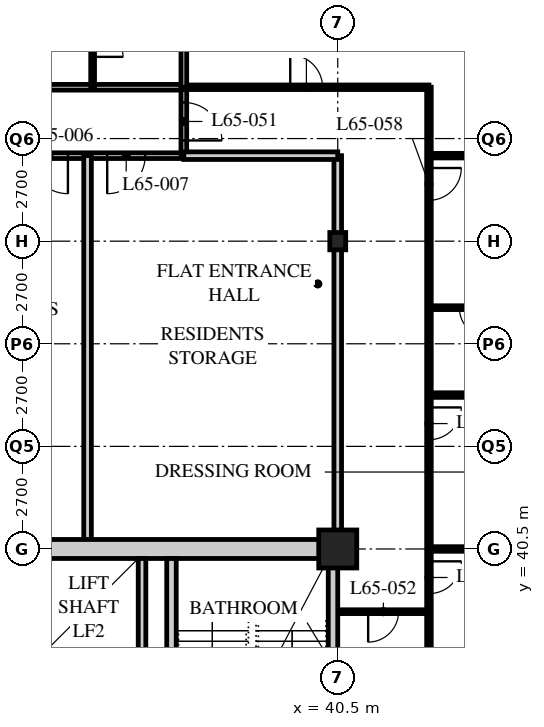
"""IFC4 building model, lengths in metres.
Left out: names, types, materials, properties, quantities, classifications, styles, units other than length and angle.
Written with IfcOpenShell. Run it as: python <this file> out.ifc"""

import sys

from ifc_helpers import new_model, si_unit, direction, frame, frame_2d, origin, origin_2d, place, context, subcontext, project, spatial, rectangle, hollow_rectangle, i_section, extrude, element, fill, save


model = new_model("IFC4")
c1 = context("Model", 3, precision=1e-05, world=origin(), true_north=direction((0.0, 1.0)))
c2 = subcontext(c1, "Body", "Model", "MODEL_VIEW")
j1 = project(units=[si_unit("LENGTHUNIT", "METRE"), si_unit("PLANEANGLEUNIT", "RADIAN")], contexts=[c1])
p1 = place(None, origin())
s1 = spatial("IfcSite", under=j1, at=p1, CompositionType="ELEMENT")
p2 = place(p1, origin())
s2 = spatial("IfcBuilding", under=s1, at=p2, CompositionType="ELEMENT")
p3 = place(p2, frame((0.0, 0.0, 254.1)))
s3 = spatial("IfcBuildingStorey", under=s2, at=p3, CompositionType="ELEMENT", Elevation=254.1)
p4 = place(p3, frame((40.5, 40.5, 0.0), z_axis=(0.0, 0.0, 1.0), x_axis=(1.0, 0.0, 0.0)))
e1 = element("IfcColumn", 1, at=p4, inside=s3, PredefinedType="COLUMN", context=c2, shape_type="SweptSolid", body=[
    extrude(hollow_rectangle(XDim=1.0, YDim=1.0, WallThickness=0.1, at=origin_2d()), origin(), (0.0, 0.0, 1.0), 3.9),
])
p5 = place(p3, frame((40.5, 48.6, 0.0), z_axis=(0.0, 0.0, 1.0), x_axis=(1.0, 0.0, 0.0)))
e2 = element("IfcColumn", 2, at=p5, inside=s3, PredefinedType="COLUMN", context=c2, shape_type="SweptSolid", body=[
    extrude(i_section(OverallWidth=0.418, OverallDepth=0.456, WebThickness=0.042, FlangeThickness=0.067, FilletRadius=0.015, at=origin_2d()), origin(), (0.0, 0.0, 1.0), 3.9),
])
p6 = place(p3, frame((12.15, 52.65, 0.0), z_axis=(0.0, 0.0, 1.0), x_axis=(1.0, 0.0, 0.0)))
e3 = element("IfcWall", 3, at=p6, inside=s3, PredefinedType="PARTITIONING", context=c2, shape_type="SweptSolid", body=[
    extrude(rectangle(XDim=24.3, YDim=0.15, at=frame_2d((12.15, 0.0))), origin(), (0.0, 0.0, 1.0), 3.69),
])
p7 = place(p6, frame((4.45, 0.0, 0.0)))
e4 = element("IfcOpeningElement", 4, at=p7, cuts=e3, PredefinedType="OPENING", context=c2, shape_type="SweptSolid", body=[
    extrude(rectangle(XDim=1.0, YDim=2.1, at=frame_2d((0.5, 1.05))), frame((0.0, 0.085, 0.0), z_axis=(0.0, -1.0, 0.0), x_axis=(1.0, 0.0, 0.0)), (0.0, 0.0, 1.0), 0.17),
])
p8 = place(p6, frame((1.525, 0.0, 0.0)))
e5 = element("IfcOpeningElement", 5, at=p8, cuts=e3, PredefinedType="OPENING", context=c2, shape_type="SweptSolid", body=[
    extrude(rectangle(XDim=1.0, YDim=2.1, at=frame_2d((0.5, 1.05))), frame((0.0, 0.085, 0.0), z_axis=(0.0, -1.0, 0.0), x_axis=(1.0, 0.0, 0.0)), (0.0, 0.0, 1.0), 0.17),
])
p9 = place(p3, frame((29.56, 50.85, 0.0), z_axis=(0.0, 0.0, 1.0), x_axis=(1.0, 0.0, 0.0)))
e6 = element("IfcWall", 6, at=p9, inside=s3, PredefinedType="PARTITIONING", context=c2, shape_type="SweptSolid", body=[
    extrude(rectangle(XDim=6.89, YDim=0.15, at=frame_2d((3.445, 0.0))), origin(), (0.0, 0.0, 1.0), 3.69),
])
p10 = place(p9, frame((0.657, 0.0, 0.0)))
e7 = element("IfcOpeningElement", 7, at=p10, cuts=e6, PredefinedType="OPENING", context=c2, shape_type="SweptSolid", body=[
    extrude(rectangle(XDim=1.0, YDim=2.1, at=frame_2d((0.5, 1.05))), frame((0.0, 0.085, 0.0), z_axis=(0.0, -1.0, 0.0), x_axis=(1.0, 0.0, 0.0)), (0.0, 0.0, 1.0), 0.17),
])
p11 = place(p9, frame((2.84, 0.0, 0.0)))
e8 = element("IfcOpeningElement", 8, at=p11, cuts=e6, PredefinedType="OPENING", context=c2, shape_type="SweptSolid", body=[
    extrude(rectangle(XDim=1.0, YDim=2.1, at=frame_2d((0.5, 1.05))), frame((0.0, 0.085, 0.0), z_axis=(0.0, -1.0, 0.0), x_axis=(1.0, 0.0, 0.0)), (0.0, 0.0, 1.0), 0.17),
])
p12 = place(p9, frame((4.873, 0.0, 0.0)))
e9 = element("IfcOpeningElement", 9, at=p12, cuts=e6, PredefinedType="OPENING", context=c2, shape_type="SweptSolid", body=[
    extrude(rectangle(XDim=1.0, YDim=2.1, at=frame_2d((0.5, 1.05))), frame((0.0, 0.085, 0.0), z_axis=(0.0, -1.0, 0.0), x_axis=(1.0, 0.0, 0.0)), (0.0, 0.0, 1.0), 0.17),
])
p13 = place(p3, frame((33.917, 50.85, 0.0), z_axis=(0.0, 0.0, 1.0), x_axis=(0.0, -1.0, 0.0)))
e10 = element("IfcWall", 10, at=p13, inside=s3, PredefinedType="SOLIDWALL", context=c2, shape_type="SweptSolid", body=[
    extrude(rectangle(XDim=10.35, YDim=0.2, at=frame_2d((5.175, 0.0))), origin(), (0.0, 0.0, 1.0), 3.69),
])
p14 = place(p3, frame((36.45, 50.85, 0.0), z_axis=(0.0, 0.0, 1.0), x_axis=(0.0, 1.0, 0.0)))
e11 = element("IfcWall", 11, at=p14, inside=s3, PredefinedType="PARTITIONING", context=c2, shape_type="SweptSolid", body=[
    extrude(rectangle(XDim=1.8, YDim=0.15, at=frame_2d((0.9, 0.0))), origin(), (0.0, 0.0, 1.0), 3.69),
])
p15 = place(p14, frame((0.4, 0.0, 0.0)))
e12 = element("IfcOpeningElement", 12, at=p15, cuts=e11, PredefinedType="OPENING", context=c2, shape_type="SweptSolid", body=[
    extrude(rectangle(XDim=1.0, YDim=2.1, at=frame_2d((0.5, 1.05))), frame((0.0, 0.085, 0.0), z_axis=(0.0, -1.0, 0.0), x_axis=(1.0, 0.0, 0.0)), (0.0, 0.0, 1.0), 0.17),
])
p16 = place(p3, frame((40.5, 40.5, 0.0), z_axis=(0.0, 0.0, 1.0), x_axis=(0.0, 1.0, 0.0)))
e13 = element("IfcWall", 13, at=p16, inside=s3, PredefinedType="SOLIDWALL", context=c2, shape_type="SweptSolid", body=[
    extrude(rectangle(XDim=10.35, YDim=0.2, at=frame_2d((5.175, 0.0))), origin(), (0.0, 0.0, 1.0), 3.078),
])
p17 = place(p3, frame((34.05, 52.65, 0.0), z_axis=(0.0, 0.0, 1.0), x_axis=(0.0, 1.0, 0.0)))
e14 = element("IfcWall", 14, at=p17, inside=s3, PredefinedType="PARTITIONING", context=c2, shape_type="SweptSolid", body=[
    extrude(rectangle(XDim=2.4, YDim=0.1, at=frame_2d((1.2, 0.0))), origin(), (0.0, 0.0, 1.0), 3.69),
])
p18 = place(p17, frame((0.8, 0.0, 0.0)))
e15 = element("IfcOpeningElement", 15, at=p18, cuts=e14, PredefinedType="OPENING", context=c2, shape_type="SweptSolid", body=[
    extrude(rectangle(XDim=0.8, YDim=2.1, at=frame_2d((0.4, 1.05))), frame((0.0, 0.06, 0.0), z_axis=(0.0, -1.0, 0.0), x_axis=(1.0, 0.0, 0.0)), (0.0, 0.0, 1.0), 0.12),
])
p19 = place(p3, frame((40.5, 38.85, 0.0), z_axis=(0.0, 0.0, 1.0), x_axis=(1.0, 0.0, 0.0)))
e16 = element("IfcWall", 16, at=p19, inside=s3, PredefinedType="PARTITIONING", context=c2, shape_type="SweptSolid", body=[
    extrude(rectangle(XDim=2.4, YDim=0.1, at=frame_2d((1.2, 0.0))), origin(), (0.0, 0.0, 1.0), 3.69),
])
p20 = place(p19, frame((0.8, 0.0, 0.0)))
e17 = element("IfcOpeningElement", 17, at=p20, cuts=e16, PredefinedType="OPENING", context=c2, shape_type="SweptSolid", body=[
    extrude(rectangle(XDim=0.8, YDim=2.1, at=frame_2d((0.4, 1.05))), frame((0.0, 0.06, 0.0), z_axis=(0.0, -1.0, 0.0), x_axis=(1.0, 0.0, 0.0)), (0.0, 0.0, 1.0), 0.12),
])
p21 = place(p3, frame((42.9, 52.65, 0.0), z_axis=(0.0, 0.0, 1.0), x_axis=(0.0, -1.0, 0.0)))
e18 = element("IfcWall", 18, at=p21, inside=s3, PredefinedType="PARTITIONING", context=c2, shape_type="SweptSolid", body=[
    extrude(rectangle(XDim=16.2, YDim=0.12, at=frame_2d((8.1, 0.0))), origin(), (0.0, 0.0, 1.0), 3.69),
])
p22 = place(p21, frame((2.125, 0.0, 0.0)))
e19 = element("IfcOpeningElement", 19, at=p22, cuts=e18, PredefinedType="OPENING", context=c2, shape_type="SweptSolid", body=[
    extrude(rectangle(XDim=0.85, YDim=2.1, at=frame_2d((0.425, 1.05))), frame((0.0, 0.07, 0.0), z_axis=(0.0, -1.0, 0.0), x_axis=(1.0, 0.0, 0.0)), (0.0, 0.0, 1.0), 0.14),
])
p23 = place(p21, frame((8.425, 0.0, 0.0)))
e20 = element("IfcOpeningElement", 20, at=p23, cuts=e18, PredefinedType="OPENING", context=c2, shape_type="SweptSolid", body=[
    extrude(rectangle(XDim=0.85, YDim=2.1, at=frame_2d((0.425, 1.05))), frame((0.0, 0.07, 0.0), z_axis=(0.0, -1.0, 0.0), x_axis=(1.0, 0.0, 0.0)), (0.0, 0.0, 1.0), 0.14),
])
p24 = place(p21, frame((12.475, 0.0, 0.0)))
e21 = element("IfcOpeningElement", 21, at=p24, cuts=e18, PredefinedType="OPENING", context=c2, shape_type="SweptSolid", body=[
    extrude(rectangle(XDim=0.85, YDim=2.1, at=frame_2d((0.425, 1.05))), frame((0.0, 0.07, 0.0), z_axis=(0.0, -1.0, 0.0), x_axis=(1.0, 0.0, 0.0)), (0.0, 0.0, 1.0), 0.14),
])
p25 = place(p3, frame((36.45, 52.65, 0.0), z_axis=(0.0, 0.0, 1.0), x_axis=(1.0, 0.0, 0.0)))
e22 = element("IfcWall", 22, at=p25, inside=s3, PredefinedType="PARTITIONING", context=c2, shape_type="SweptSolid", body=[
    extrude(rectangle(XDim=6.45, YDim=0.12, at=frame_2d((3.225, 0.0))), origin(), (0.0, 0.0, 1.0), 3.69),
])
p26 = place(p25, frame((2.8, 0.0, 0.0)))
e23 = element("IfcOpeningElement", 23, at=p26, cuts=e22, PredefinedType="OPENING", context=c2, shape_type="SweptSolid", body=[
    extrude(rectangle(XDim=0.85, YDim=2.1, at=frame_2d((0.425, 1.05))), frame((0.0, 0.07, 0.0), z_axis=(0.0, -1.0, 0.0), x_axis=(1.0, 0.0, 0.0)), (0.0, 0.0, 1.0), 0.14),
])
p27 = place(p3, frame((36.45, 50.85, 0.0), z_axis=(0.0, 0.0, 1.0), x_axis=(1.0, 0.0, 0.0)))
e24 = element("IfcWall", 24, at=p27, inside=s3, PredefinedType="SOLIDWALL", context=c2, shape_type="SweptSolid", body=[
    extrude(rectangle(XDim=4.05, YDim=0.2, at=frame_2d((2.025, 0.0))), origin(), (0.0, 0.0, 1.0), 3.69),
])
p28 = place(p3, frame((42.9, 50.85, 0.0), z_axis=(0.0, 0.0, 1.0), x_axis=(1.0, 0.0, 0.0)))
e25 = element("IfcWall", 25, at=p28, inside=s3, PredefinedType="PARTITIONING", context=c2, shape_type="SweptSolid", body=[
    extrude(rectangle(XDim=13.5, YDim=0.12, at=frame_2d((6.75, 0.0))), origin(), (0.0, 0.0, 1.0), 3.69),
])
p29 = place(p3, frame((36.45, 64.5, 0.0), z_axis=(0.0, 0.0, 1.0), x_axis=(0.0, -1.0, 0.0)))
e26 = element("IfcWall", 26, at=p29, inside=s3, PredefinedType="PARTITIONING", context=c2, shape_type="SweptSolid", body=[
    extrude(rectangle(XDim=11.85, YDim=0.15, at=frame_2d((5.925, 0.0))), origin(), (0.0, 0.0, 1.0), 3.69),
])
p30 = place(p3, frame((42.9, 46.85, 0.0), z_axis=(0.0, 0.0, 1.0), x_axis=(1.0, 0.0, 0.0)))
e27 = element("IfcWall", 27, at=p30, inside=s3, PredefinedType="PARTITIONING", context=c2, shape_type="SweptSolid", body=[
    extrude(rectangle(XDim=2.4, YDim=0.1, at=frame_2d((1.2, 0.0))), origin(), (0.0, 0.0, 1.0), 3.69),
])
p31 = place(p30, frame((0.8, 0.0, 0.0)))
e28 = element("IfcOpeningElement", 28, at=p31, cuts=e27, PredefinedType="OPENING", context=c2, shape_type="SweptSolid", body=[
    extrude(rectangle(XDim=0.8, YDim=2.1, at=frame_2d((0.4, 1.05))), frame((0.0, 0.06, 0.0), z_axis=(0.0, -1.0, 0.0), x_axis=(1.0, 0.0, 0.0)), (0.0, 0.0, 1.0), 0.12),
])
p32 = place(p3, frame((42.9, 44.55, 0.0), z_axis=(0.0, 0.0, 1.0), x_axis=(1.0, 0.0, 0.0)))
e29 = element("IfcWall", 29, at=p32, inside=s3, PredefinedType="PARTITIONING", context=c2, shape_type="SweptSolid", body=[
    extrude(rectangle(XDim=13.5, YDim=0.12, at=frame_2d((6.75, 0.0))), origin(), (0.0, 0.0, 1.0), 3.69),
])
p33 = place(p3, frame((42.9, 40.5, 0.0), z_axis=(0.0, 0.0, 1.0), x_axis=(1.0, 0.0, 0.0)))
e30 = element("IfcWall", 30, at=p33, inside=s3, PredefinedType="PARTITIONING", context=c2, shape_type="SweptSolid", body=[
    extrude(rectangle(XDim=13.5, YDim=0.12, at=frame_2d((6.75, 0.0))), origin(), (0.0, 0.0, 1.0), 3.078),
])
p34 = place(p3, frame((15.95, 40.5, 0.0), z_axis=(0.0, 0.0, 1.0), x_axis=(1.0, 0.0, 0.0)))
e31 = element("IfcWall", 31, at=p34, inside=s3, PredefinedType="SOLIDWALL", context=c2, shape_type="SweptSolid", body=[
    extrude(rectangle(XDim=24.55, YDim=0.5, at=frame_2d((12.275, 0.0))), origin(), (0.0, 0.0, 1.0), 3.04),
])
p35 = place(p34, frame((11.5, 0.0, 0.0)))
e32 = element("IfcOpeningElement", 32, at=p35, cuts=e31, PredefinedType="OPENING", context=c2, shape_type="SweptSolid", body=[
    extrude(rectangle(XDim=1.8, YDim=2.4, at=frame_2d((0.9, 1.2))), frame((0.0, 0.26, 0.0), z_axis=(0.0, -1.0, 0.0), x_axis=(1.0, 0.0, 0.0)), (0.0, 0.0, 1.0), 0.52),
])
p36 = place(p3, frame((40.375, 24.55, 0.0), z_axis=(0.0, 0.0, 1.0), x_axis=(0.0, 1.0, 0.0)))
e33 = element("IfcWall", 33, at=p36, inside=s3, PredefinedType="SOLIDWALL", context=c2, shape_type="SweptSolid", body=[
    extrude(rectangle(XDim=15.7, YDim=0.25, at=frame_2d((7.85, 0.0))), origin(), (0.0, 0.0, 1.0), 3.078),
])
p37 = place(p3, frame((36.125, 32.5, 0.0), z_axis=(0.0, 0.0, 1.0), x_axis=(0.0, 1.0, 0.0)))
e34 = element("IfcWall", 34, at=p37, inside=s3, PredefinedType="SOLIDWALL", context=c2, shape_type="SweptSolid", body=[
    extrude(rectangle(XDim=7.75, YDim=0.25, at=frame_2d((3.875, 0.0))), origin(), (0.0, 0.0, 1.0), 3.69),
])
p38 = place(p37, frame((0.45, 0.0, 0.0)))
e35 = element("IfcOpeningElement", 35, at=p38, cuts=e34, PredefinedType="OPENING", context=c2, shape_type="SweptSolid", body=[
    extrude(rectangle(XDim=1.2, YDim=2.1, at=frame_2d((0.6, 1.05))), frame((0.0, 0.135, 0.0), z_axis=(0.0, -1.0, 0.0), x_axis=(1.0, 0.0, 0.0)), (0.0, 0.0, 1.0), 0.27),
])
p39 = place(p3, frame((35.35, 37.65, 0.0), z_axis=(0.0, 0.0, 1.0), x_axis=(0.0, 1.0, 0.0)))
e36 = element("IfcWall", 36, at=p39, inside=s3, PredefinedType="SOLIDWALL", context=c2, shape_type="SweptSolid", body=[
    extrude(rectangle(XDim=2.6, YDim=0.2, at=frame_2d((1.3, 0.0))), origin(), (0.0, 0.0, 1.0), 3.69),
])
p40 = place(p11, origin())
e37 = element("IfcDoor", 37, at=p40, inside=s3, OperationType="SINGLE_SWING_LEFT", PredefinedType="DOOR", context=c2, shape_type="SweptSolid", body=[
    extrude(rectangle(XDim=1.0, YDim=2.1, at=frame_2d((0.5, 1.05))), frame((0.0, 0.025, 0.0), z_axis=(0.0, -1.0, 0.0), x_axis=(1.0, 0.0, 0.0)), (0.0, 0.0, 1.0), 0.05),
])
fill(e8, e37)
p41 = place(p12, origin())
e38 = element("IfcDoor", 38, at=p41, inside=s3, OperationType="SINGLE_SWING_RIGHT", PredefinedType="DOOR", context=c2, shape_type="SweptSolid", body=[
    extrude(rectangle(XDim=1.0, YDim=2.1, at=frame_2d((0.5, 1.05))), frame((0.0, 0.025, 0.0), z_axis=(0.0, -1.0, 0.0), x_axis=(1.0, 0.0, 0.0)), (0.0, 0.0, 1.0), 0.05),
])
fill(e9, e38)
p42 = place(p18, origin())
e39 = element("IfcDoor", 39, at=p42, inside=s3, OperationType="SINGLE_SWING_RIGHT", PredefinedType="DOOR", context=c2, shape_type="SweptSolid", body=[
    extrude(rectangle(XDim=0.8, YDim=2.1, at=frame_2d((0.4, 1.05))), frame((0.0, 0.025, 0.0), z_axis=(0.0, -1.0, 0.0), x_axis=(1.0, 0.0, 0.0)), (0.0, 0.0, 1.0), 0.05),
])
fill(e15, e39)
p43 = place(p15, origin())
e40 = element("IfcDoor", 40, at=p43, inside=s3, OperationType="SINGLE_SWING_RIGHT", PredefinedType="DOOR", context=c2, shape_type="SweptSolid", body=[
    extrude(rectangle(XDim=1.0, YDim=2.1, at=frame_2d((0.5, 1.05))), frame((0.0, 0.025, 0.0), z_axis=(0.0, -1.0, 0.0), x_axis=(1.0, 0.0, 0.0)), (0.0, 0.0, 1.0), 0.05),
])
fill(e12, e40)
p44 = place(p20, origin())
e41 = element("IfcDoor", 41, at=p44, inside=s3, OperationType="SINGLE_SWING_RIGHT", PredefinedType="DOOR", context=c2, shape_type="SweptSolid", body=[
    extrude(rectangle(XDim=0.8, YDim=2.1, at=frame_2d((0.4, 1.05))), frame((0.0, 0.025, 0.0), z_axis=(0.0, -1.0, 0.0), x_axis=(1.0, 0.0, 0.0)), (0.0, 0.0, 1.0), 0.05),
])
fill(e17, e41)
p45 = place(p26, origin())
e42 = element("IfcDoor", 42, at=p45, inside=s3, OperationType="SINGLE_SWING_LEFT", PredefinedType="DOOR", context=c2, shape_type="SweptSolid", body=[
    extrude(rectangle(XDim=0.85, YDim=2.1, at=frame_2d((0.425, 1.05))), frame((0.0, 0.025, 0.0), z_axis=(0.0, -1.0, 0.0), x_axis=(1.0, 0.0, 0.0)), (0.0, 0.0, 1.0), 0.05),
])
fill(e23, e42)
p46 = place(p31, origin())
e43 = element("IfcDoor", 43, at=p46, inside=s3, OperationType="SINGLE_SWING_LEFT", PredefinedType="DOOR", context=c2, shape_type="SweptSolid", body=[
    extrude(rectangle(XDim=0.8, YDim=2.1, at=frame_2d((0.4, 1.05))), frame((0.0, 0.025, 0.0), z_axis=(0.0, -1.0, 0.0), x_axis=(1.0, 0.0, 0.0)), (0.0, 0.0, 1.0), 0.05),
])
fill(e28, e43)
p47 = place(p22, origin())
e44 = element("IfcDoor", 44, at=p47, inside=s3, OperationType="SINGLE_SWING_LEFT", PredefinedType="DOOR", context=c2, shape_type="SweptSolid", body=[
    extrude(rectangle(XDim=0.85, YDim=2.1, at=frame_2d((0.425, 1.05))), frame((0.0, 0.025, 0.0), z_axis=(0.0, -1.0, 0.0), x_axis=(1.0, 0.0, 0.0)), (0.0, 0.0, 1.0), 0.05),
])
fill(e19, e44)
p48 = place(p23, origin())
e45 = element("IfcDoor", 45, at=p48, inside=s3, OperationType="SINGLE_SWING_LEFT", PredefinedType="DOOR", context=c2, shape_type="SweptSolid", body=[
    extrude(rectangle(XDim=0.85, YDim=2.1, at=frame_2d((0.425, 1.05))), frame((0.0, 0.025, 0.0), z_axis=(0.0, -1.0, 0.0), x_axis=(1.0, 0.0, 0.0)), (0.0, 0.0, 1.0), 0.05),
])
fill(e20, e45)
p49 = place(p24, origin())
e46 = element("IfcDoor", 46, at=p49, inside=s3, OperationType="SINGLE_SWING_LEFT", PredefinedType="DOOR", context=c2, shape_type="SweptSolid", body=[
    extrude(rectangle(XDim=0.85, YDim=2.1, at=frame_2d((0.425, 1.05))), frame((0.0, 0.025, 0.0), z_axis=(0.0, -1.0, 0.0), x_axis=(1.0, 0.0, 0.0)), (0.0, 0.0, 1.0), 0.05),
])
fill(e21, e46)
save(model, sys.argv[1])
